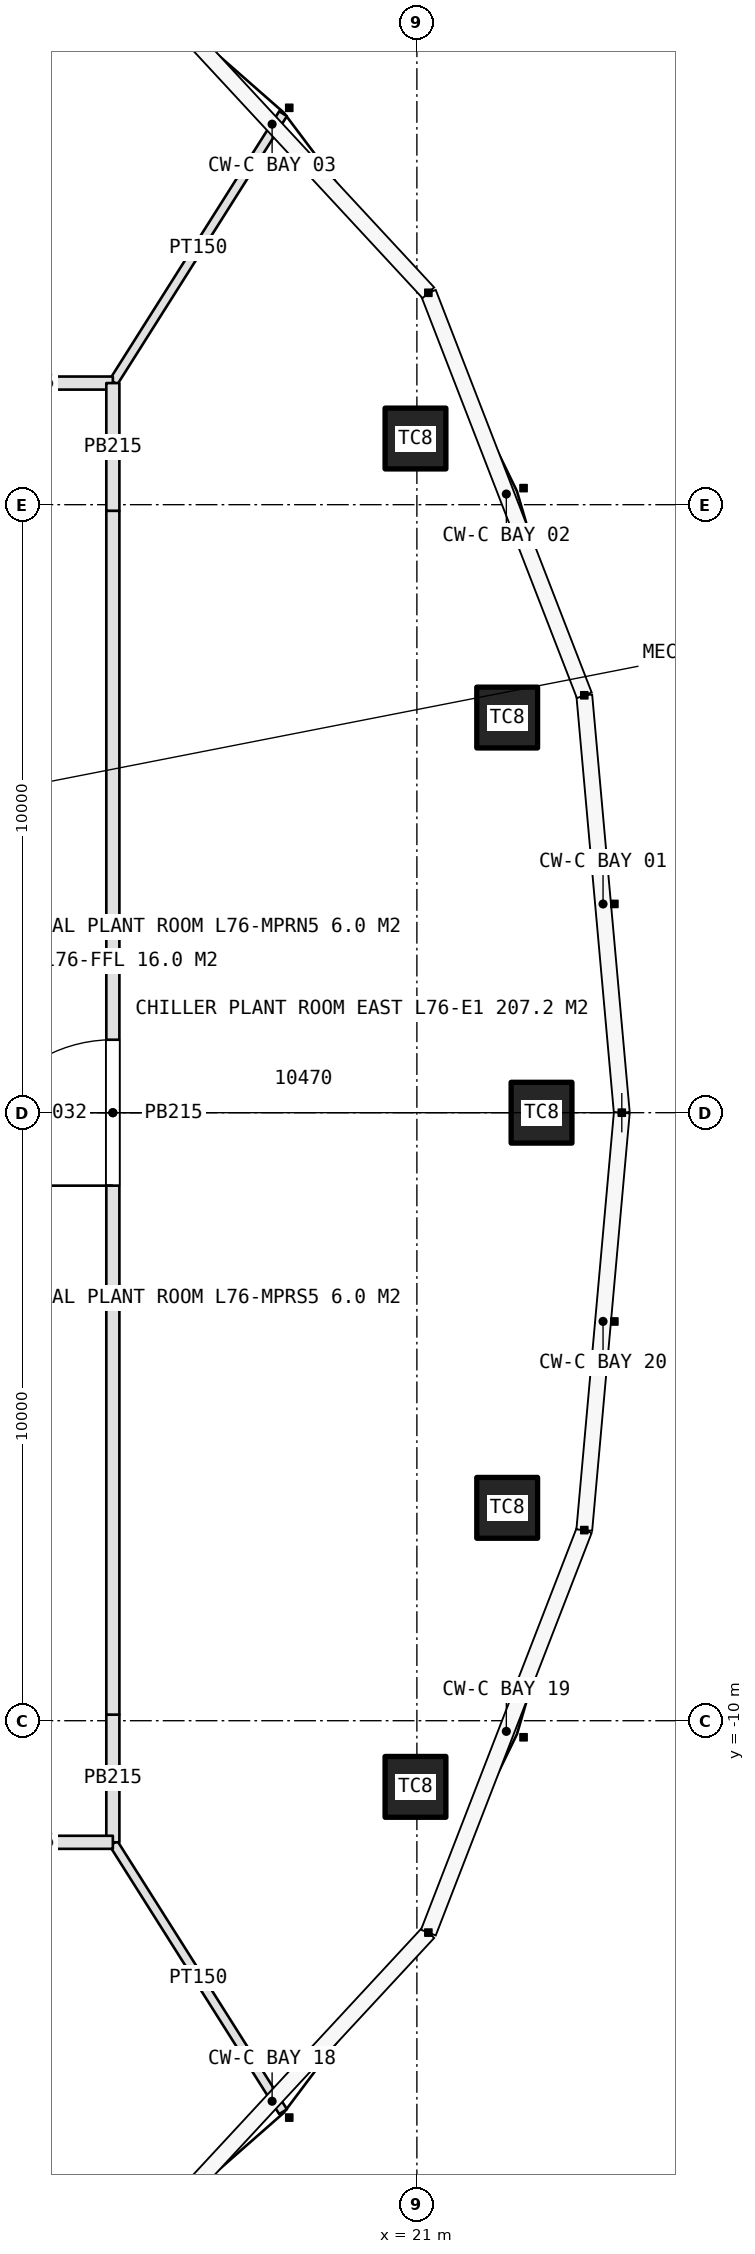
"""IFC4 building model, lengths in metres.
Left out: names, types, materials, properties, quantities, classifications, styles, units other than length and angle.
Written with IfcOpenShell. Run it as: python <this file> out.ifc"""

import sys

from ifc_helpers import new_model, si_unit, direction, frame, frame_2d, origin, origin_2d, place, context, subcontext, project, spatial, rectangle, extrude, element, fill, save


model = new_model("IFC4")
c1 = context("Model", 3, precision=1e-05, world=origin(), true_north=direction((0.0, 1.0)))
c2 = subcontext(c1, "Body", "Model", "MODEL_VIEW")
j1 = project(units=[si_unit("LENGTHUNIT", "METRE"), si_unit("PLANEANGLEUNIT", "RADIAN")], contexts=[c1])
p1 = place(None, origin())
s1 = spatial("IfcSite", under=j1, at=p1, CompositionType="ELEMENT")
p2 = place(p1, origin())
s2 = spatial("IfcBuilding", under=s1, at=p2, CompositionType="ELEMENT")
p3 = place(p2, frame((0.0, 0.0, 339.2)))
s3 = spatial("IfcBuildingStorey", under=s2, at=p3, CompositionType="ELEMENT", Elevation=339.2)
for number, where, z_axis, x_axis in (
    (1, (23.05, 0.0, 0.0), (0.0, 0.0, 1.0), (1.0, 0.0, 0.0)),
    (2, (22.485, 6.499, 0.0), (0.0, 0.0, 1.0), (1.0, 0.0, 0.0)),
    (3, (20.977, 11.088, 0.0), (0.0, 0.0, 1.0), (1.0, 0.0, 0.0)),
    (4, (20.977, -11.088, 0.0), (0.0, 0.0, 1.0), (1.0, 0.0, 0.0)),
    (5, (22.485, -6.499, 0.0), (0.0, 0.0, 1.0), (1.0, 0.0, 0.0)),
):
    element("IfcColumn", number, at=place(p3, frame(where, z_axis=z_axis, x_axis=x_axis)), inside=s3, PredefinedType="COLUMN", context=c2, shape_type="SweptSolid", body=[
        extrude(rectangle(XDim=1.0, YDim=1.0, at=origin_2d()), origin(), (0.0, 0.0, 1.0), 5.0),
    ])
for number, where, z_axis, x_axis in (
    (6, (16.011, -12.017, 0.0), (0.0, 0.0, 1.0), (0.534, -0.845, 0.0)),
    (7, (16.011, 12.017, 0.0), (0.0, 0.0, 1.0), (0.534, 0.845, 0.0)),
):
    element("IfcWall", number, at=place(p3, frame(where, z_axis=z_axis, x_axis=x_axis)), inside=s3, PredefinedType="PARTITIONING", context=c2, shape_type="SweptSolid", body=[
        extrude(rectangle(XDim=5.22, YDim=0.15, at=frame_2d((2.61, 0.0))), origin(), (0.0, 0.0, 1.0), 4.2),
    ])
for number, where, z_axis, x_axis in (
    (8, (16.0, 12.0, 0.0), (0.0, 0.0, 1.0), (-1.0, 0.0, 0.0)),
    (9, (16.0, -12.0, 0.0), (0.0, 0.0, 1.0), (0.0, 1.0, 0.0)),
):
    element("IfcWall", number, at=place(p3, frame(where, z_axis=z_axis, x_axis=x_axis)), inside=s3, PredefinedType="PARTITIONING", context=c2, shape_type="SweptSolid", body=[
        extrude(rectangle(XDim=2.1, YDim=0.215, at=frame_2d((1.05, 0.0))), origin(), (0.0, 0.0, 1.0), 4.2),
    ])
p4 = place(p3, frame((16.0, -9.9, 0.0), z_axis=(0.0, 0.0, 1.0), x_axis=(0.0, 1.0, 0.0)))
e10 = element("IfcWall", 10, at=p4, inside=s3, PredefinedType="PARTITIONING", context=c2, shape_type="SweptSolid", body=[
    extrude(rectangle(XDim=19.8, YDim=0.215, at=frame_2d((9.9, 0.0))), origin(), (0.0, 0.0, 1.0), 4.2),
])
p5 = place(p4, frame((8.7, 0.0, 0.0)))
e11 = element("IfcOpeningElement", 11, at=p5, cuts=e10, PredefinedType="OPENING", context=c2, shape_type="SweptSolid", body=[
    extrude(rectangle(XDim=2.4, YDim=2.4, at=frame_2d((1.2, 1.2))), frame((0.0, 0.118, 0.0), z_axis=(0.0, -1.0, 0.0), x_axis=(1.0, 0.0, 0.0)), (0.0, 0.0, 1.0), 0.235),
])
for number, where, z_axis, x_axis in (
    (12, (16.0, 9.9, 0.0), (0.0, 0.0, 1.0), (0.0, 1.0, 0.0)),
    (13, (13.9, -12.0, 0.0), (0.0, 0.0, 1.0), (1.0, 0.0, 0.0)),
):
    element("IfcWall", number, at=place(p3, frame(where, z_axis=z_axis, x_axis=x_axis)), inside=s3, PredefinedType="PARTITIONING", context=c2, shape_type="SweptSolid", body=[
        extrude(rectangle(XDim=2.1, YDim=0.215, at=frame_2d((1.05, 0.0))), origin(), (0.0, 0.0, 1.0), 4.2),
    ])
p6 = place(p5, origin())
e14 = element("IfcDoor", 14, at=p6, inside=s3, OperationType="DOUBLE_DOOR_SINGLE_SWING", PredefinedType="DOOR", context=c2, shape_type="SweptSolid", body=[
    extrude(rectangle(XDim=2.4, YDim=2.4, at=frame_2d((1.2, 1.2))), frame((0.0, 0.025, 0.0), z_axis=(0.0, -1.0, 0.0), x_axis=(1.0, 0.0, 0.0)), (0.0, 0.0, 1.0), 0.05),
])
fill(e11, e14)
save(model, sys.argv[1])
